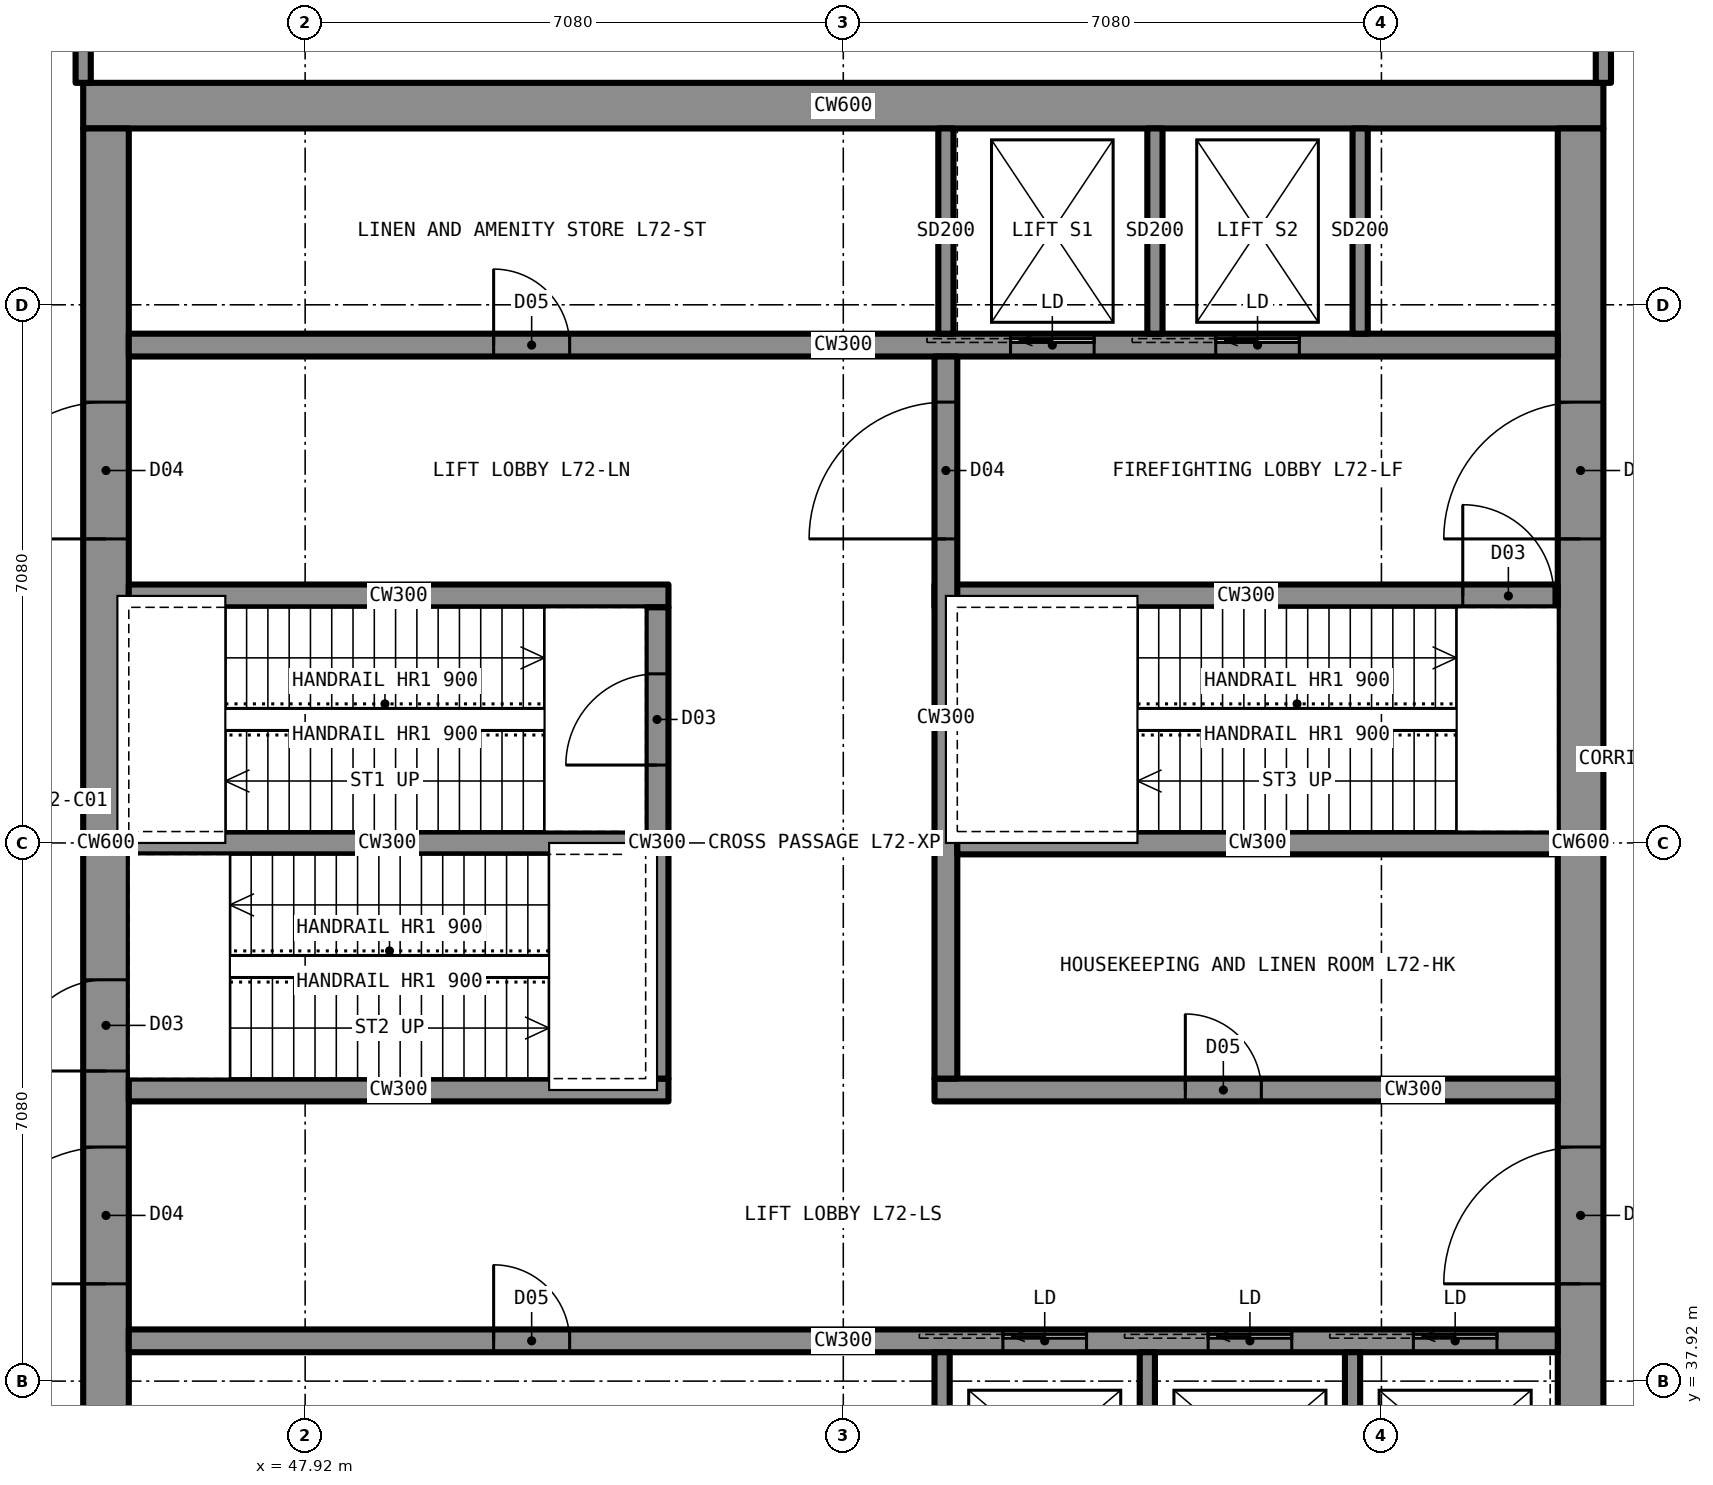
"""IFC4 building model, lengths in metres.
Left out: names, types, materials, properties, quantities, classifications, styles, units other than length and angle.
Written with IfcOpenShell. Run it as: python <this file> out.ifc"""

import sys

from ifc_helpers import new_model, si_unit, direction, frame, frame_2d, origin, place, context, subcontext, project, spatial, rectangle, extrude, element, fill, save


model = new_model("IFC4")
c1 = context("Model", 3, precision=1e-05, world=origin(), true_north=direction((0.0, 1.0)))
c2 = subcontext(c1, "Body", "Model", "MODEL_VIEW")
j1 = project(units=[si_unit("LENGTHUNIT", "METRE"), si_unit("PLANEANGLEUNIT", "RADIAN")], contexts=[c1])
p1 = place(None, origin())
s1 = spatial("IfcSite", under=j1, at=p1, CompositionType="ELEMENT")
p2 = place(p1, origin())
s2 = spatial("IfcBuilding", under=s1, at=p2, CompositionType="ELEMENT")
p3 = place(p2, frame((0.0, 0.0, 266.7)))
s3 = spatial("IfcBuildingStorey", under=s2, at=p3, CompositionType="ELEMENT", Elevation=266.7)
p4 = place(p3, frame((45.0, 54.7, 0.0), z_axis=(0.0, 0.0, 1.0), x_axis=(1.0, 0.0, 0.0)))
e1 = element("IfcWall", 1, at=p4, inside=s3, PredefinedType="SHEAR", context=c2, shape_type="SweptSolid", body=[
    extrude(rectangle(XDim=20.0, YDim=0.6, at=frame_2d((10.0, 0.0))), origin(), (0.0, 0.0, 1.0), 5.5),
])
p5 = place(p3, frame((64.7, 35.6, 0.0), z_axis=(0.0, 0.0, 1.0), x_axis=(0.0, 1.0, 0.0)))
e2 = element("IfcWall", 2, at=p5, inside=s3, PredefinedType="SHEAR", context=c2, shape_type="SweptSolid", body=[
    extrude(rectangle(XDim=18.8, YDim=0.6, at=frame_2d((9.4, 0.0))), origin(), (0.0, 0.0, 1.0), 5.5),
])
p6 = place(p5, frame((13.4, 0.0, 0.0)))
e3 = element("IfcOpeningElement", 3, at=p6, cuts=e2, PredefinedType="OPENING", context=c2, shape_type="SweptSolid", body=[
    extrude(rectangle(XDim=1.8, YDim=2.2, at=frame_2d((0.9, 1.1))), frame((0.0, 0.31, 0.0), z_axis=(0.0, -1.0, 0.0), x_axis=(1.0, 0.0, 0.0)), (0.0, 0.0, 1.0), 0.62),
])
p7 = place(p5, frame((3.6, 0.0, 0.0)))
e4 = element("IfcOpeningElement", 4, at=p7, cuts=e2, PredefinedType="OPENING", context=c2, shape_type="SweptSolid", body=[
    extrude(rectangle(XDim=1.8, YDim=2.2, at=frame_2d((0.9, 1.1))), frame((0.0, 0.31, 0.0), z_axis=(0.0, -1.0, 0.0), x_axis=(1.0, 0.0, 0.0)), (0.0, 0.0, 1.0), 0.62),
])
p8 = place(p3, frame((45.3, 35.6, 0.0), z_axis=(0.0, 0.0, 1.0), x_axis=(0.0, 1.0, 0.0)))
e5 = element("IfcWall", 5, at=p8, inside=s3, PredefinedType="SHEAR", context=c2, shape_type="SweptSolid", body=[
    extrude(rectangle(XDim=18.8, YDim=0.6, at=frame_2d((9.4, 0.0))), origin(), (0.0, 0.0, 1.0), 5.5),
])
p9 = place(p8, frame((13.4, 0.0, 0.0)))
e6 = element("IfcOpeningElement", 6, at=p9, cuts=e5, PredefinedType="OPENING", context=c2, shape_type="SweptSolid", body=[
    extrude(rectangle(XDim=1.8, YDim=2.2, at=frame_2d((0.9, 1.1))), frame((0.0, 0.31, 0.0), z_axis=(0.0, -1.0, 0.0), x_axis=(1.0, 0.0, 0.0)), (0.0, 0.0, 1.0), 0.62),
])
p10 = place(p8, frame((3.6, 0.0, 0.0)))
e7 = element("IfcOpeningElement", 7, at=p10, cuts=e5, PredefinedType="OPENING", context=c2, shape_type="SweptSolid", body=[
    extrude(rectangle(XDim=1.8, YDim=2.2, at=frame_2d((0.9, 1.1))), frame((0.0, 0.31, 0.0), z_axis=(0.0, -1.0, 0.0), x_axis=(1.0, 0.0, 0.0)), (0.0, 0.0, 1.0), 0.62),
])
p11 = place(p8, frame((6.4, 0.0, 0.0)))
e8 = element("IfcOpeningElement", 8, at=p11, cuts=e5, PredefinedType="OPENING", context=c2, shape_type="SweptSolid", body=[
    extrude(rectangle(XDim=1.2, YDim=2.2, at=frame_2d((0.6, 1.1))), frame((0.0, 0.31, 0.0), z_axis=(0.0, -1.0, 0.0), x_axis=(1.0, 0.0, 0.0)), (0.0, 0.0, 1.0), 0.62),
])
p12 = place(p3, frame((45.6, 51.55, 0.0), z_axis=(0.0, 0.0, 1.0), x_axis=(1.0, 0.0, 0.0)))
e9 = element("IfcWall", 9, at=p12, inside=s3, PredefinedType="SHEAR", context=c2, shape_type="SweptSolid", body=[
    extrude(rectangle(XDim=18.8, YDim=0.3, at=frame_2d((9.4, 0.0))), origin(), (0.0, 0.0, 1.0), 5.5),
])
p13 = place(p12, frame((4.8, 0.0, 0.0)))
e10 = element("IfcOpeningElement", 10, at=p13, cuts=e9, PredefinedType="OPENING", context=c2, shape_type="SweptSolid", body=[
    extrude(rectangle(XDim=1.0, YDim=2.1, at=frame_2d((0.5, 1.05))), frame((0.0, 0.16, 0.0), z_axis=(0.0, -1.0, 0.0), x_axis=(1.0, 0.0, 0.0)), (0.0, 0.0, 1.0), 0.32),
])
p14 = place(p12, frame((11.6, 0.0, 0.0)))
e11 = element("IfcOpeningElement", 11, at=p14, cuts=e9, PredefinedType="OPENING", context=c2, shape_type="SweptSolid", body=[
    extrude(rectangle(XDim=1.1, YDim=2.2, at=frame_2d((0.55, 1.1))), frame((0.0, 0.16, 0.0), z_axis=(0.0, -1.0, 0.0), x_axis=(1.0, 0.0, 0.0)), (0.0, 0.0, 1.0), 0.32),
])
p15 = place(p12, frame((14.3, 0.0, 0.0)))
e12 = element("IfcOpeningElement", 12, at=p15, cuts=e9, PredefinedType="OPENING", context=c2, shape_type="SweptSolid", body=[
    extrude(rectangle(XDim=1.1, YDim=2.2, at=frame_2d((0.55, 1.1))), frame((0.0, 0.16, 0.0), z_axis=(0.0, -1.0, 0.0), x_axis=(1.0, 0.0, 0.0)), (0.0, 0.0, 1.0), 0.32),
])
p16 = place(p3, frame((45.6, 38.45, 0.0), z_axis=(0.0, 0.0, 1.0), x_axis=(1.0, 0.0, 0.0)))
e13 = element("IfcWall", 13, at=p16, inside=s3, PredefinedType="SHEAR", context=c2, shape_type="SweptSolid", body=[
    extrude(rectangle(XDim=18.8, YDim=0.3, at=frame_2d((9.4, 0.0))), origin(), (0.0, 0.0, 1.0), 5.5),
])
p17 = place(p16, frame((4.8, 0.0, 0.0)))
e14 = element("IfcOpeningElement", 14, at=p17, cuts=e13, PredefinedType="OPENING", context=c2, shape_type="SweptSolid", body=[
    extrude(rectangle(XDim=1.0, YDim=2.1, at=frame_2d((0.5, 1.05))), frame((0.0, 0.16, 0.0), z_axis=(0.0, -1.0, 0.0), x_axis=(1.0, 0.0, 0.0)), (0.0, 0.0, 1.0), 0.32),
])
p18 = place(p16, frame((11.5, 0.0, 0.0)))
e15 = element("IfcOpeningElement", 15, at=p18, cuts=e13, PredefinedType="OPENING", context=c2, shape_type="SweptSolid", body=[
    extrude(rectangle(XDim=1.1, YDim=2.2, at=frame_2d((0.55, 1.1))), frame((0.0, 0.16, 0.0), z_axis=(0.0, -1.0, 0.0), x_axis=(1.0, 0.0, 0.0)), (0.0, 0.0, 1.0), 0.32),
])
p19 = place(p16, frame((14.2, 0.0, 0.0)))
e16 = element("IfcOpeningElement", 16, at=p19, cuts=e13, PredefinedType="OPENING", context=c2, shape_type="SweptSolid", body=[
    extrude(rectangle(XDim=1.1, YDim=2.2, at=frame_2d((0.55, 1.1))), frame((0.0, 0.16, 0.0), z_axis=(0.0, -1.0, 0.0), x_axis=(1.0, 0.0, 0.0)), (0.0, 0.0, 1.0), 0.32),
])
p20 = place(p16, frame((16.9, 0.0, 0.0)))
e17 = element("IfcOpeningElement", 17, at=p20, cuts=e13, PredefinedType="OPENING", context=c2, shape_type="SweptSolid", body=[
    extrude(rectangle(XDim=1.1, YDim=2.2, at=frame_2d((0.55, 1.1))), frame((0.0, 0.16, 0.0), z_axis=(0.0, -1.0, 0.0), x_axis=(1.0, 0.0, 0.0)), (0.0, 0.0, 1.0), 0.32),
])
p21 = place(p3, frame((45.6, 48.25, 0.0), z_axis=(0.0, 0.0, 1.0), x_axis=(1.0, 0.0, 0.0)))
e18 = element("IfcWall", 18, at=p21, inside=s3, PredefinedType="SHEAR", context=c2, shape_type="SweptSolid", body=[
    extrude(rectangle(XDim=7.1, YDim=0.3, at=frame_2d((3.55, 0.0))), origin(), (0.0, 0.0, 1.0), 5.5),
])
p22 = place(p3, frame((56.2, 48.25, 0.0), z_axis=(0.0, 0.0, 1.0), x_axis=(1.0, 0.0, 0.0)))
e19 = element("IfcWall", 19, at=p22, inside=s3, PredefinedType="SHEAR", context=c2, shape_type="SweptSolid", body=[
    extrude(rectangle(XDim=8.2, YDim=0.3, at=frame_2d((4.1, 0.0))), origin(), (0.0, 0.0, 1.0), 5.5),
])
p23 = place(p22, frame((6.95, 0.0, 0.0)))
e20 = element("IfcOpeningElement", 20, at=p23, cuts=e19, PredefinedType="OPENING", context=c2, shape_type="SweptSolid", body=[
    extrude(rectangle(XDim=1.2, YDim=2.2, at=frame_2d((0.6, 1.1))), frame((0.0, 0.16, 0.0), z_axis=(0.0, -1.0, 0.0), x_axis=(1.0, 0.0, 0.0)), (0.0, 0.0, 1.0), 0.32),
])
p24 = place(p3, frame((45.6, 41.75, 0.0), z_axis=(0.0, 0.0, 1.0), x_axis=(1.0, 0.0, 0.0)))
e21 = element("IfcWall", 21, at=p24, inside=s3, PredefinedType="SHEAR", context=c2, shape_type="SweptSolid", body=[
    extrude(rectangle(XDim=7.1, YDim=0.3, at=frame_2d((3.55, 0.0))), origin(), (0.0, 0.0, 1.0), 5.5),
])
p25 = place(p3, frame((56.2, 41.75, 0.0), z_axis=(0.0, 0.0, 1.0), x_axis=(1.0, 0.0, 0.0)))
e22 = element("IfcWall", 22, at=p25, inside=s3, PredefinedType="SHEAR", context=c2, shape_type="SweptSolid", body=[
    extrude(rectangle(XDim=8.2, YDim=0.3, at=frame_2d((4.1, 0.0))), origin(), (0.0, 0.0, 1.0), 5.5),
])
p26 = place(p25, frame((3.3, 0.0, 0.0)))
e23 = element("IfcOpeningElement", 23, at=p26, cuts=e22, PredefinedType="OPENING", context=c2, shape_type="SweptSolid", body=[
    extrude(rectangle(XDim=1.0, YDim=2.1, at=frame_2d((0.5, 1.05))), frame((0.0, 0.16, 0.0), z_axis=(0.0, -1.0, 0.0), x_axis=(1.0, 0.0, 0.0)), (0.0, 0.0, 1.0), 0.32),
])
p27 = place(p3, frame((52.55, 41.9, 0.0), z_axis=(0.0, 0.0, 1.0), x_axis=(0.0, 1.0, 0.0)))
e24 = element("IfcWall", 24, at=p27, inside=s3, PredefinedType="SHEAR", context=c2, shape_type="SweptSolid", body=[
    extrude(rectangle(XDim=6.2, YDim=0.3, at=frame_2d((3.1, 0.0))), origin(), (0.0, 0.0, 1.0), 5.5),
])
p28 = place(p27, frame((4.125, 0.0, 0.0)))
e25 = element("IfcOpeningElement", 25, at=p28, cuts=e24, PredefinedType="OPENING", context=c2, shape_type="SweptSolid", body=[
    extrude(rectangle(XDim=1.2, YDim=2.2, at=frame_2d((0.6, 1.1))), frame((0.0, 0.16, 0.0), z_axis=(0.0, -1.0, 0.0), x_axis=(1.0, 0.0, 0.0)), (0.0, 0.0, 1.0), 0.32),
])
p29 = place(p3, frame((56.35, 41.9, 0.0), z_axis=(0.0, 0.0, 1.0), x_axis=(0.0, 1.0, 0.0)))
e26 = element("IfcWall", 26, at=p29, inside=s3, PredefinedType="SHEAR", context=c2, shape_type="SweptSolid", body=[
    extrude(rectangle(XDim=9.5, YDim=0.3, at=frame_2d((4.75, 0.0))), origin(), (0.0, 0.0, 1.0), 5.5),
])
p30 = place(p29, frame((7.1, 0.0, 0.0)))
e27 = element("IfcOpeningElement", 27, at=p30, cuts=e26, PredefinedType="OPENING", context=c2, shape_type="SweptSolid", body=[
    extrude(rectangle(XDim=1.8, YDim=2.2, at=frame_2d((0.9, 1.1))), frame((0.0, 0.16, 0.0), z_axis=(0.0, -1.0, 0.0), x_axis=(1.0, 0.0, 0.0)), (0.0, 0.0, 1.0), 0.32),
])
p31 = place(p3, frame((45.6, 45.0, 0.0), z_axis=(0.0, 0.0, 1.0), x_axis=(1.0, 0.0, 0.0)))
e28 = element("IfcWall", 28, at=p31, inside=s3, PredefinedType="SHEAR", context=c2, shape_type="SweptSolid", body=[
    extrude(rectangle(XDim=6.8, YDim=0.3, at=frame_2d((3.4, 0.0))), origin(), (0.0, 0.0, 1.0), 5.5),
])
p32 = place(p3, frame((56.5, 45.0, 0.0), z_axis=(0.0, 0.0, 1.0), x_axis=(1.0, 0.0, 0.0)))
e29 = element("IfcWall", 29, at=p32, inside=s3, PredefinedType="SHEAR", context=c2, shape_type="SweptSolid", body=[
    extrude(rectangle(XDim=7.9, YDim=0.3, at=frame_2d((3.95, 0.0))), origin(), (0.0, 0.0, 1.0), 5.5),
])
for number, where, z_axis, x_axis in (
    (30, (45.0, 55.0, 0.0), (0.0, 0.0, 1.0), (0.0, 1.0, 0.0)),
    (31, (65.0, 55.0, 0.0), (0.0, 0.0, 1.0), (0.0, 1.0, 0.0)),
):
    element("IfcWall", number, at=place(p3, frame(where, z_axis=z_axis, x_axis=x_axis)), inside=s3, PredefinedType="PARTITIONING", context=c2, shape_type="SweptSolid", body=[
        extrude(rectangle(XDim=1.8, YDim=0.2, at=frame_2d((0.9, 0.0))), origin(), (0.0, 0.0, 1.0), 5.28),
    ])
for number, where, z_axis, x_axis in (
    (32, (59.1, 51.7, 0.0), (0.0, 0.0, 1.0), (0.0, 1.0, 0.0)),
    (33, (61.8, 51.7, 0.0), (0.0, 0.0, 1.0), (0.0, 1.0, 0.0)),
    (34, (56.35, 51.7, 0.0), (0.0, 0.0, 1.0), (0.0, 1.0, 0.0)),
    (35, (56.3, 35.6, 0.0), (0.0, 0.0, 1.0), (0.0, 1.0, 0.0)),
    (36, (59.0, 35.6, 0.0), (0.0, 0.0, 1.0), (0.0, 1.0, 0.0)),
    (37, (61.7, 35.6, 0.0), (0.0, 0.0, 1.0), (0.0, 1.0, 0.0)),
):
    element("IfcWall", number, at=place(p3, frame(where, z_axis=z_axis, x_axis=x_axis)), inside=s3, PredefinedType="PARTITIONING", context=c2, shape_type="SweptSolid", body=[
        extrude(rectangle(XDim=2.7, YDim=0.2, at=frame_2d((1.35, 0.0))), origin(), (0.0, 0.0, 1.0), 5.28),
    ])
p33 = place(p9, origin())
e38 = element("IfcDoor", 38, at=p33, inside=s3, OperationType="DOUBLE_DOOR_SINGLE_SWING", PredefinedType="DOOR", context=c2, shape_type="SweptSolid", body=[
    extrude(rectangle(XDim=1.8, YDim=2.2, at=frame_2d((0.9, 1.1))), frame((0.0, 0.025, 0.0), z_axis=(0.0, -1.0, 0.0), x_axis=(1.0, 0.0, 0.0)), (0.0, 0.0, 1.0), 0.05),
])
fill(e6, e38)
p34 = place(p10, origin())
e39 = element("IfcDoor", 39, at=p34, inside=s3, OperationType="DOUBLE_DOOR_SINGLE_SWING", PredefinedType="DOOR", context=c2, shape_type="SweptSolid", body=[
    extrude(rectangle(XDim=1.8, YDim=2.2, at=frame_2d((0.9, 1.1))), frame((0.0, 0.025, 0.0), z_axis=(0.0, -1.0, 0.0), x_axis=(1.0, 0.0, 0.0)), (0.0, 0.0, 1.0), 0.05),
])
fill(e7, e39)
p35 = place(p6, origin())
e40 = element("IfcDoor", 40, at=p35, inside=s3, OperationType="DOUBLE_DOOR_SINGLE_SWING", PredefinedType="DOOR", context=c2, shape_type="SweptSolid", body=[
    extrude(rectangle(XDim=1.8, YDim=2.2, at=frame_2d((0.9, 1.1))), frame((0.0, 0.025, 0.0), z_axis=(0.0, -1.0, 0.0), x_axis=(1.0, 0.0, 0.0)), (0.0, 0.0, 1.0), 0.05),
])
fill(e3, e40)
p36 = place(p7, origin())
e41 = element("IfcDoor", 41, at=p36, inside=s3, OperationType="DOUBLE_DOOR_SINGLE_SWING", PredefinedType="DOOR", context=c2, shape_type="SweptSolid", body=[
    extrude(rectangle(XDim=1.8, YDim=2.2, at=frame_2d((0.9, 1.1))), frame((0.0, 0.025, 0.0), z_axis=(0.0, -1.0, 0.0), x_axis=(1.0, 0.0, 0.0)), (0.0, 0.0, 1.0), 0.05),
])
fill(e4, e41)
p37 = place(p30, origin())
e42 = element("IfcDoor", 42, at=p37, inside=s3, OperationType="DOUBLE_DOOR_SINGLE_SWING", PredefinedType="DOOR", context=c2, shape_type="SweptSolid", body=[
    extrude(rectangle(XDim=1.8, YDim=2.2, at=frame_2d((0.9, 1.1))), frame((0.0, 0.025, 0.0), z_axis=(0.0, -1.0, 0.0), x_axis=(1.0, 0.0, 0.0)), (0.0, 0.0, 1.0), 0.05),
])
fill(e27, e42)
p38 = place(p28, origin())
e43 = element("IfcDoor", 43, at=p38, inside=s3, OperationType="SINGLE_SWING_LEFT", PredefinedType="DOOR", context=c2, shape_type="SweptSolid", body=[
    extrude(rectangle(XDim=1.2, YDim=2.2, at=frame_2d((0.6, 1.1))), frame((0.0, 0.025, 0.0), z_axis=(0.0, -1.0, 0.0), x_axis=(1.0, 0.0, 0.0)), (0.0, 0.0, 1.0), 0.05),
])
fill(e25, e43)
p39 = place(p11, origin())
e44 = element("IfcDoor", 44, at=p39, inside=s3, OperationType="SINGLE_SWING_LEFT", PredefinedType="DOOR", context=c2, shape_type="SweptSolid", body=[
    extrude(rectangle(XDim=1.2, YDim=2.2, at=frame_2d((0.6, 1.1))), frame((0.0, 0.025, 0.0), z_axis=(0.0, -1.0, 0.0), x_axis=(1.0, 0.0, 0.0)), (0.0, 0.0, 1.0), 0.05),
])
fill(e8, e44)
p40 = place(p23, origin())
e45 = element("IfcDoor", 45, at=p40, inside=s3, OperationType="SINGLE_SWING_LEFT", PredefinedType="DOOR", context=c2, shape_type="SweptSolid", body=[
    extrude(rectangle(XDim=1.2, YDim=2.2, at=frame_2d((0.6, 1.1))), frame((0.0, 0.025, 0.0), z_axis=(0.0, -1.0, 0.0), x_axis=(1.0, 0.0, 0.0)), (0.0, 0.0, 1.0), 0.05),
])
fill(e20, e45)
p41 = place(p26, origin())
e46 = element("IfcDoor", 46, at=p41, inside=s3, OperationType="SINGLE_SWING_LEFT", PredefinedType="DOOR", context=c2, shape_type="SweptSolid", body=[
    extrude(rectangle(XDim=1.0, YDim=2.1, at=frame_2d((0.5, 1.05))), frame((0.0, 0.025, 0.0), z_axis=(0.0, -1.0, 0.0), x_axis=(1.0, 0.0, 0.0)), (0.0, 0.0, 1.0), 0.05),
])
fill(e23, e46)
p42 = place(p13, origin())
e47 = element("IfcDoor", 47, at=p42, inside=s3, OperationType="SINGLE_SWING_LEFT", PredefinedType="DOOR", context=c2, shape_type="SweptSolid", body=[
    extrude(rectangle(XDim=1.0, YDim=2.1, at=frame_2d((0.5, 1.05))), frame((0.0, 0.025, 0.0), z_axis=(0.0, -1.0, 0.0), x_axis=(1.0, 0.0, 0.0)), (0.0, 0.0, 1.0), 0.05),
])
fill(e10, e47)
p43 = place(p17, origin())
e48 = element("IfcDoor", 48, at=p43, inside=s3, OperationType="SINGLE_SWING_LEFT", PredefinedType="DOOR", context=c2, shape_type="SweptSolid", body=[
    extrude(rectangle(XDim=1.0, YDim=2.1, at=frame_2d((0.5, 1.05))), frame((0.0, 0.025, 0.0), z_axis=(0.0, -1.0, 0.0), x_axis=(1.0, 0.0, 0.0)), (0.0, 0.0, 1.0), 0.05),
])
fill(e14, e48)
p44 = place(p14, origin())
e49 = element("IfcDoor", 49, at=p44, inside=s3, OperationType="SLIDING_TO_LEFT", PredefinedType="DOOR", context=c2, shape_type="SweptSolid", body=[
    extrude(rectangle(XDim=1.1, YDim=2.2, at=frame_2d((0.55, 1.1))), frame((0.0, 0.025, 0.0), z_axis=(0.0, -1.0, 0.0), x_axis=(1.0, 0.0, 0.0)), (0.0, 0.0, 1.0), 0.05),
])
fill(e11, e49)
p45 = place(p15, origin())
e50 = element("IfcDoor", 50, at=p45, inside=s3, OperationType="SLIDING_TO_LEFT", PredefinedType="DOOR", context=c2, shape_type="SweptSolid", body=[
    extrude(rectangle(XDim=1.1, YDim=2.2, at=frame_2d((0.55, 1.1))), frame((0.0, 0.025, 0.0), z_axis=(0.0, -1.0, 0.0), x_axis=(1.0, 0.0, 0.0)), (0.0, 0.0, 1.0), 0.05),
])
fill(e12, e50)
p46 = place(p18, origin())
e51 = element("IfcDoor", 51, at=p46, inside=s3, OperationType="SLIDING_TO_LEFT", PredefinedType="DOOR", context=c2, shape_type="SweptSolid", body=[
    extrude(rectangle(XDim=1.1, YDim=2.2, at=frame_2d((0.55, 1.1))), frame((0.0, 0.025, 0.0), z_axis=(0.0, -1.0, 0.0), x_axis=(1.0, 0.0, 0.0)), (0.0, 0.0, 1.0), 0.05),
])
fill(e15, e51)
p47 = place(p19, origin())
e52 = element("IfcDoor", 52, at=p47, inside=s3, OperationType="SLIDING_TO_LEFT", PredefinedType="DOOR", context=c2, shape_type="SweptSolid", body=[
    extrude(rectangle(XDim=1.1, YDim=2.2, at=frame_2d((0.55, 1.1))), frame((0.0, 0.025, 0.0), z_axis=(0.0, -1.0, 0.0), x_axis=(1.0, 0.0, 0.0)), (0.0, 0.0, 1.0), 0.05),
])
fill(e16, e52)
p48 = place(p20, origin())
e53 = element("IfcDoor", 53, at=p48, inside=s3, OperationType="SLIDING_TO_LEFT", PredefinedType="DOOR", context=c2, shape_type="SweptSolid", body=[
    extrude(rectangle(XDim=1.1, YDim=2.2, at=frame_2d((0.55, 1.1))), frame((0.0, 0.025, 0.0), z_axis=(0.0, -1.0, 0.0), x_axis=(1.0, 0.0, 0.0)), (0.0, 0.0, 1.0), 0.05),
])
fill(e17, e53)
save(model, sys.argv[1])
